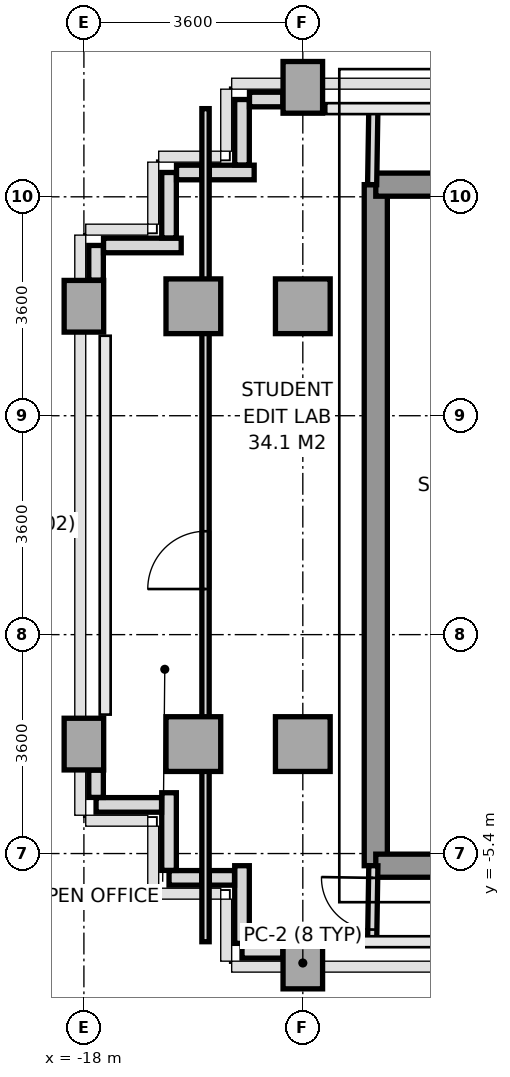
"""IFC4 building model, lengths in metres.
Left out: names, types, materials, properties, quantities, classifications, styles, units other than length and angle.
Written with IfcOpenShell. Run it as: python <this file> out.ifc"""

import sys

from ifc_helpers import new_model, si_unit, direction, frame, frame_2d, origin, origin_2d, place, context, subcontext, project, spatial, rectangle, extrude, source, transform, mapped, element, fill, save


model = new_model("IFC4")
c1 = context("Model", 3, precision=1e-05, world=origin(), true_north=direction((0.0, 1.0)))
c2 = subcontext(c1, "Body", "Model", "MODEL_VIEW")
j1 = project(units=[si_unit("LENGTHUNIT", "METRE"), si_unit("PLANEANGLEUNIT", "RADIAN")], contexts=[c1])
p1 = place(None, origin())
s1 = spatial("IfcSite", under=j1, at=p1, CompositionType="ELEMENT")
p2 = place(p1, origin())
s2 = spatial("IfcBuilding", under=s1, at=p2, CompositionType="ELEMENT")
p3 = place(p2, frame((0.0, 0.0, 174.0)))
s3 = spatial("IfcBuildingStorey", under=s2, at=p3, CompositionType="ELEMENT", Elevation=174.0)
m1 = source(origin(), c2, "Body", "SweptSolid", [
    extrude(rectangle(XDim=0.65, YDim=0.85, at=origin_2d()), origin(), (0.0, 0.0, 1.0), 3.2),
])
for number, where, z_axis, x_axis in (
    (1, (-18.0, -3.6, 0.0), (0.0, 0.0, 1.0), (1.0, 0.0, 0.0)),
    (2, (-18.0, 3.6, 0.0), (0.0, 0.0, 1.0), (1.0, 0.0, 0.0)),
):
    element("IfcColumn", number, at=place(p3, frame(where, z_axis=z_axis, x_axis=x_axis)), inside=s3, PredefinedType="COLUMN", context=c2, shape_type="MappedRepresentation", body=[
        mapped(m1, transform((0.0, 0.0, 0.0), x_axis=(1.0, 0.0, 0.0), y_axis=(0.0, 1.0, 0.0), z_axis=(0.0, 0.0, 1.0), scale=1.0)),
    ])
m2 = source(origin(), c2, "Body", "SweptSolid", [
    extrude(rectangle(XDim=0.9, YDim=0.9, at=origin_2d()), origin(), (0.0, 0.0, 1.0), 3.2),
])
for number, where, z_axis, x_axis in (
    (3, (-16.2, -3.6, 0.0), (0.0, 0.0, 1.0), (1.0, 0.0, 0.0)),
    (4, (-16.2, 3.6, 0.0), (0.0, 0.0, 1.0), (1.0, 0.0, 0.0)),
):
    element("IfcColumn", number, at=place(p3, frame(where, z_axis=z_axis, x_axis=x_axis)), inside=s3, PredefinedType="COLUMN", context=c2, shape_type="MappedRepresentation", body=[
        mapped(m2, transform((0.0, 0.0, 0.0), x_axis=(1.0, 0.0, 0.0), y_axis=(0.0, 1.0, 0.0), z_axis=(0.0, 0.0, 1.0), scale=1.0)),
    ])
p4 = place(p3, frame((-14.4, -7.2, 0.0), z_axis=(0.0, 0.0, 1.0), x_axis=(1.0, 0.0, 0.0)))
e5 = element("IfcColumn", 5, at=p4, inside=s3, PredefinedType="COLUMN", context=c2, shape_type="MappedRepresentation", body=[
    mapped(m1, transform((0.0, 0.0, 0.0), x_axis=(1.0, 0.0, 0.0), y_axis=(0.0, 1.0, 0.0), z_axis=(0.0, 0.0, 1.0), scale=1.0)),
])
for number, where, z_axis, x_axis in (
    (6, (-14.4, -3.6, 0.0), (0.0, 0.0, 1.0), (1.0, 0.0, 0.0)),
    (7, (-14.4, 3.6, 0.0), (0.0, 0.0, 1.0), (1.0, 0.0, 0.0)),
):
    element("IfcColumn", number, at=place(p3, frame(where, z_axis=z_axis, x_axis=x_axis)), inside=s3, PredefinedType="COLUMN", context=c2, shape_type="MappedRepresentation", body=[
        mapped(m2, transform((0.0, 0.0, 0.0), x_axis=(1.0, 0.0, 0.0), y_axis=(0.0, 1.0, 0.0), z_axis=(0.0, 0.0, 1.0), scale=1.0)),
    ])
p5 = place(p3, frame((-14.4, 7.2, 0.0), z_axis=(0.0, 0.0, 1.0), x_axis=(1.0, 0.0, 0.0)))
e8 = element("IfcColumn", 8, at=p5, inside=s3, PredefinedType="COLUMN", context=c2, shape_type="MappedRepresentation", body=[
    mapped(m1, transform((0.0, 0.0, 0.0), x_axis=(1.0, 0.0, 0.0), y_axis=(0.0, 1.0, 0.0), z_axis=(0.0, 0.0, 1.0), scale=1.0)),
])
p6 = place(p3, frame((-14.728, -7.0, 0.0), z_axis=(0.0, 0.0, 1.0), x_axis=(-1.0, 0.0, 0.0)))
e9 = element("IfcWall", 9, at=p6, inside=s3, PredefinedType="PARAPET", context=c2, shape_type="SweptSolid", body=[
    extrude(rectangle(XDim=0.672, YDim=0.24, at=frame_2d((0.336, 0.0))), origin(), (0.0, 0.0, 1.0), 1.15),
])
p7 = place(p3, frame((-15.4, -6.877, 0.0), z_axis=(0.0, 0.0, 1.0), x_axis=(0.0, 1.0, 0.0)))
e10 = element("IfcWall", 10, at=p7, inside=s3, PredefinedType="PARAPET", context=c2, shape_type="SweptSolid", body=[
    extrude(rectangle(XDim=1.277, YDim=0.24, at=frame_2d((0.638, 0.0))), origin(), (0.0, 0.0, 1.0), 1.15),
])
p8 = place(p3, frame((-15.523, -5.8, 0.0), z_axis=(0.0, 0.0, 1.0), x_axis=(-1.0, 0.0, 0.0)))
e11 = element("IfcWall", 11, at=p8, inside=s3, PredefinedType="PARAPET", context=c2, shape_type="SweptSolid", body=[
    extrude(rectangle(XDim=0.414, YDim=0.24, at=frame_2d((0.207, 0.0))), origin(), (0.0, 0.0, 1.0), 1.15),
])
p9 = place(p3, frame((-16.063, -5.8, 0.0), z_axis=(0.0, 0.0, 1.0), x_axis=(-1.0, 0.0, 0.0)))
e12 = element("IfcWall", 12, at=p9, inside=s3, PredefinedType="PARAPET", context=c2, shape_type="SweptSolid", body=[
    extrude(rectangle(XDim=0.537, YDim=0.24, at=frame_2d((0.269, 0.0))), origin(), (0.0, 0.0, 1.0), 1.15),
])
p10 = place(p3, frame((-16.6, -5.677, 0.0), z_axis=(0.0, 0.0, 1.0), x_axis=(0.0, 1.0, 0.0)))
e13 = element("IfcWall", 13, at=p10, inside=s3, PredefinedType="PARAPET", context=c2, shape_type="SweptSolid", body=[
    extrude(rectangle(XDim=1.277, YDim=0.24, at=frame_2d((0.639, 0.0))), origin(), (0.0, 0.0, 1.0), 1.15),
])
p11 = place(p3, frame((-16.723, -4.6, 0.0), z_axis=(0.0, 0.0, 1.0), x_axis=(-1.0, 0.0, 0.0)))
e14 = element("IfcWall", 14, at=p11, inside=s3, PredefinedType="PARAPET", context=c2, shape_type="SweptSolid", body=[
    extrude(rectangle(XDim=1.077, YDim=0.24, at=frame_2d((0.539, 0.0))), origin(), (0.0, 0.0, 1.0), 1.15),
])
p12 = place(p3, frame((-17.8, -4.477, 0.0), z_axis=(0.0, 0.0, 1.0), x_axis=(0.0, 1.0, 0.0)))
e15 = element("IfcWall", 15, at=p12, inside=s3, PredefinedType="PARAPET", context=c2, shape_type="SweptSolid", body=[
    extrude(rectangle(XDim=0.449, YDim=0.24, at=frame_2d((0.225, 0.0))), origin(), (0.0, 0.0, 1.0), 1.15),
])
p13 = place(p3, frame((-17.8, 4.028, 0.0), z_axis=(0.0, 0.0, 1.0), x_axis=(0.0, 1.0, 0.0)))
e16 = element("IfcWall", 16, at=p13, inside=s3, PredefinedType="PARAPET", context=c2, shape_type="SweptSolid", body=[
    extrude(rectangle(XDim=0.572, YDim=0.24, at=frame_2d((0.286, 0.0))), origin(), (0.0, 0.0, 1.0), 1.15),
])
p14 = place(p3, frame((-17.677, 4.6, 0.0), z_axis=(0.0, 0.0, 1.0), x_axis=(1.0, 0.0, 0.0)))
e17 = element("IfcWall", 17, at=p14, inside=s3, PredefinedType="PARAPET", context=c2, shape_type="SweptSolid", body=[
    extrude(rectangle(XDim=1.277, YDim=0.24, at=frame_2d((0.639, 0.0))), origin(), (0.0, 0.0, 1.0), 1.15),
])
p15 = place(p3, frame((-16.6, 4.723, 0.0), z_axis=(0.0, 0.0, 1.0), x_axis=(0.0, 1.0, 0.0)))
e18 = element("IfcWall", 18, at=p15, inside=s3, PredefinedType="PARAPET", context=c2, shape_type="SweptSolid", body=[
    extrude(rectangle(XDim=1.077, YDim=0.24, at=frame_2d((0.539, 0.0))), origin(), (0.0, 0.0, 1.0), 1.15),
])
p16 = place(p3, frame((-16.477, 5.8, 0.0), z_axis=(0.0, 0.0, 1.0), x_axis=(1.0, 0.0, 0.0)))
e19 = element("IfcWall", 19, at=p16, inside=s3, PredefinedType="PARAPET", context=c2, shape_type="SweptSolid", body=[
    extrude(rectangle(XDim=0.414, YDim=0.24, at=frame_2d((0.207, 0.0))), origin(), (0.0, 0.0, 1.0), 1.15),
])
p17 = place(p3, frame((-15.937, 5.8, 0.0), z_axis=(0.0, 0.0, 1.0), x_axis=(1.0, 0.0, 0.0)))
e20 = element("IfcWall", 20, at=p17, inside=s3, PredefinedType="PARAPET", context=c2, shape_type="SweptSolid", body=[
    extrude(rectangle(XDim=0.737, YDim=0.24, at=frame_2d((0.369, 0.0))), origin(), (0.0, 0.0, 1.0), 1.15),
])
p18 = place(p3, frame((-15.4, 5.923, 0.0), z_axis=(0.0, 0.0, 1.0), x_axis=(0.0, 1.0, 0.0)))
e21 = element("IfcWall", 21, at=p18, inside=s3, PredefinedType="PARAPET", context=c2, shape_type="SweptSolid", body=[
    extrude(rectangle(XDim=1.077, YDim=0.24, at=frame_2d((0.539, 0.0))), origin(), (0.0, 0.0, 1.0), 1.15),
])
p19 = place(p3, frame((-15.277, 7.0, 0.0), z_axis=(0.0, 0.0, 1.0), x_axis=(1.0, 0.0, 0.0)))
e22 = element("IfcWall", 22, at=p19, inside=s3, PredefinedType="PARAPET", context=c2, shape_type="SweptSolid", body=[
    extrude(rectangle(XDim=0.549, YDim=0.24, at=frame_2d((0.274, 0.0))), origin(), (0.0, 0.0, 1.0), 1.15),
])
p20 = place(p3, frame((-13.2, -5.6, 0.0), z_axis=(0.0, 0.0, 1.0), x_axis=(0.0, 1.0, 0.0)))
e23 = element("IfcWall", 23, at=p20, inside=s3, PredefinedType="SHEAR", context=c2, shape_type="SweptSolid", body=[
    extrude(rectangle(XDim=11.2, YDim=0.38, at=frame_2d((5.6, 0.0))), origin(), (0.0, 0.0, 1.0), 3.2),
])
p21 = place(p3, frame((-13.2, 5.6, 0.0), z_axis=(0.0, 0.0, 1.0), x_axis=(1.0, 0.0, 0.0)))
e24 = element("IfcWall", 24, at=p21, inside=s3, PredefinedType="SHEAR", context=c2, shape_type="SweptSolid", body=[
    extrude(rectangle(XDim=1.844, YDim=0.38, at=frame_2d((0.922, 0.0))), origin(), (0.0, 0.0, 1.0), 3.2),
])
p22 = place(p3, frame((-13.2, -5.6, 0.0), z_axis=(0.0, 0.0, 1.0), x_axis=(1.0, 0.0, 0.0)))
e25 = element("IfcWall", 25, at=p22, inside=s3, PredefinedType="SHEAR", context=c2, shape_type="SweptSolid", body=[
    extrude(rectangle(XDim=7.8, YDim=0.38, at=frame_2d((3.9, 0.0))), origin(), (0.0, 0.0, 1.0), 3.2),
])
p23 = place(p22, frame((3.6, 0.0, 0.0)))
e26 = element("IfcOpeningElement", 26, at=p23, cuts=e25, PredefinedType="OPENING", context=c2, shape_type="SweptSolid", body=[
    extrude(rectangle(XDim=1.2, YDim=2.2, at=frame_2d((0.6, 1.1))), frame((0.0, 0.2, 0.0), z_axis=(0.0, -1.0, 0.0), x_axis=(1.0, 0.0, 0.0)), (0.0, 0.0, 1.0), 0.4),
])
p24 = place(p3, frame((-13.26, 5.6, 0.0), z_axis=(0.0, 0.0, 1.0), x_axis=(0.016013571389, 0.999871774545, 0.0)))
e27 = element("IfcWall", 27, at=p24, inside=s3, PredefinedType="PARTITIONING", context=c2, shape_type="SweptSolid", body=[
    extrude(rectangle(XDim=1.25, YDim=0.15, at=frame_2d((0.625, 0.0))), origin(), (0.0, 0.0, 1.0), 3.2),
])
p25 = place(p3, frame((-13.26, -6.85, 0.0), z_axis=(0.0, 0.0, 1.0), x_axis=(0.016013571389, 0.999871774545, 0.0)))
e28 = element("IfcWall", 28, at=p25, inside=s3, PredefinedType="PARTITIONING", context=c2, shape_type="SweptSolid", body=[
    extrude(rectangle(XDim=1.25, YDim=0.15, at=frame_2d((0.625, 0.0))), origin(), (0.0, 0.0, 1.0), 3.2),
])
p26 = place(p25, frame((0.2, 0.0, 0.0)))
e29 = element("IfcOpeningElement", 29, at=p26, cuts=e28, PredefinedType="OPENING", context=c2, shape_type="SweptSolid", body=[
    extrude(rectangle(XDim=0.85, YDim=2.1, at=frame_2d((0.425, 1.05))), frame((0.0, 0.085, 0.0), z_axis=(0.0, -1.0, 0.0), x_axis=(1.0, 0.0, 0.0)), (0.0, 0.0, 1.0), 0.17),
])
p27 = place(p3, frame((-16.0, -6.85, 0.0), z_axis=(0.0, 0.0, 1.0), x_axis=(0.0, 1.0, 0.0)))
e30 = element("IfcWall", 30, at=p27, inside=s3, PredefinedType="PARTITIONING", context=c2, shape_type="SweptSolid", body=[
    extrude(rectangle(XDim=13.7, YDim=0.12, at=frame_2d((6.85, 0.0))), origin(), (0.0, 0.0, 1.0), 3.2),
])
p28 = place(p27, frame((5.8, 0.0, 0.0)))
e31 = element("IfcOpeningElement", 31, at=p28, cuts=e30, PredefinedType="OPENING", context=c2, shape_type="SweptSolid", body=[
    extrude(rectangle(XDim=0.95, YDim=2.15, at=frame_2d((0.475, 1.075))), frame((0.0, 0.07, 0.0), z_axis=(0.0, -1.0, 0.0), x_axis=(1.0, 0.0, 0.0)), (0.0, 0.0, 1.0), 0.14),
])
m3 = source(origin(), c2, "Body", "SweptSolid", [
    extrude(rectangle(XDim=0.85, YDim=2.1, at=frame_2d((0.425, 1.05))), frame((0.0, 0.025, 0.0), z_axis=(0.0, -1.0, 0.0), x_axis=(1.0, 0.0, 0.0)), (0.0, 0.0, 1.0), 0.05),
])
p29 = place(p26, origin())
e32 = element("IfcDoor", 32, at=p29, inside=s3, OperationType="SINGLE_SWING_RIGHT", PredefinedType="DOOR", context=c2, shape_type="MappedRepresentation", body=[
    mapped(m3, transform((0.0, 0.0, 0.0), x_axis=(1.0, 0.0, 0.0), y_axis=(0.0, 1.0, 0.0), z_axis=(0.0, 0.0, 1.0), scale=1.0)),
])
fill(e29, e32)
m4 = source(origin(), c2, "Body", "SweptSolid", [
    extrude(rectangle(XDim=0.95, YDim=2.15, at=frame_2d((0.475, 1.075))), frame((0.0, 0.025, 0.0), z_axis=(0.0, -1.0, 0.0), x_axis=(1.0, 0.0, 0.0)), (0.0, 0.0, 1.0), 0.05),
])
p30 = place(p28, origin())
e33 = element("IfcDoor", 33, at=p30, inside=s3, OperationType="SINGLE_SWING_LEFT", PredefinedType="DOOR", context=c2, shape_type="MappedRepresentation", body=[
    mapped(m4, transform((0.0, 0.0, 0.0), x_axis=(1.0, 0.0, 0.0), y_axis=(0.0, 1.0, 0.0), z_axis=(0.0, 0.0, 1.0), scale=1.0)),
])
fill(e31, e33)
save(model, sys.argv[1])
